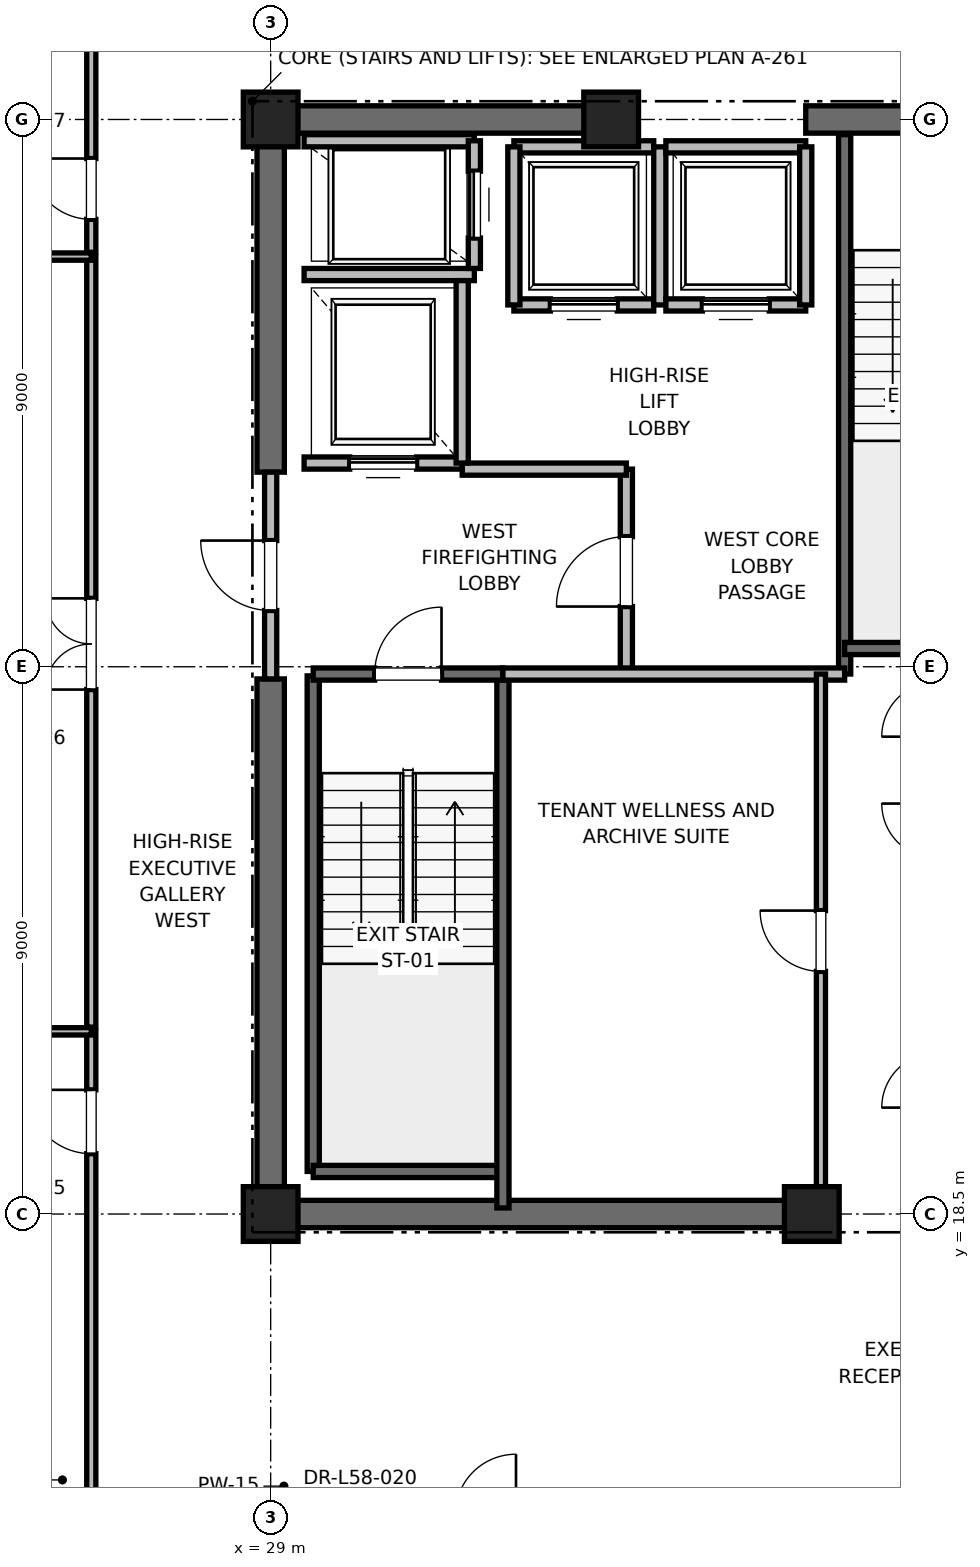
"""IFC4 building model, lengths in metres.
Left out: names, types, materials, properties, quantities, classifications, styles, units other than length and angle.
Written with IfcOpenShell. Run it as: python <this file> out.ifc"""

import sys

from ifc_helpers import new_model, si_unit, direction, frame, frame_2d, origin, origin_2d, place, context, subcontext, project, spatial, rectangle, extrude, element, fill, save


model = new_model("IFC4")
c1 = context("Model", 3, precision=1e-05, world=origin(), true_north=direction((0.0, 1.0)))
c2 = subcontext(c1, "Body", "Model", "MODEL_VIEW")
j1 = project(units=[si_unit("LENGTHUNIT", "METRE"), si_unit("PLANEANGLEUNIT", "RADIAN")], contexts=[c1])
p1 = place(None, origin())
s1 = spatial("IfcSite", under=j1, at=p1, CompositionType="ELEMENT")
p2 = place(p1, origin())
s2 = spatial("IfcBuilding", under=s1, at=p2, CompositionType="ELEMENT")
p3 = place(p2, frame((0.0, 0.0, 251.2)))
s3 = spatial("IfcBuildingStorey", under=s2, at=p3, CompositionType="ELEMENT", Elevation=251.2)
for number, where, z_axis, x_axis in (
    (1, (29.0, 18.5, 0.0), (0.0, 0.0, 1.0), (1.0, 0.0, 0.0)),
    (2, (29.0, 36.5, 0.0), (0.0, 0.0, 1.0), (1.0, 0.0, 0.0)),
    (3, (37.9, 18.5, 0.0), (0.0, 0.0, 1.0), (1.0, 0.0, 0.0)),
    (4, (34.6, 36.5, 0.0), (0.0, 0.0, 1.0), (1.0, 0.0, 0.0)),
):
    element("IfcColumn", number, at=place(p3, frame(where, z_axis=z_axis, x_axis=x_axis)), inside=s3, PredefinedType="PILASTER", context=c2, shape_type="SweptSolid", body=[
        extrude(rectangle(XDim=0.9, YDim=0.9, at=origin_2d()), origin(), (0.0, 0.0, 1.0), 4.0),
    ])
p4 = place(p3, frame((29.0, 18.5, 0.0), z_axis=(0.0, 0.0, 1.0), x_axis=(1.0, 0.0, 0.0)))
e5 = element("IfcWall", 5, at=p4, inside=s3, PredefinedType="SHEAR", context=c2, shape_type="SweptSolid", body=[
    extrude(rectangle(XDim=9.2, YDim=0.45, at=frame_2d((4.6, 0.0))), origin(), (0.0, 0.0, 1.0), 3.785),
])
p5 = place(p3, frame((29.0, 36.5, 0.0), z_axis=(0.0, 0.0, 1.0), x_axis=(1.0, 0.0, 0.0)))
e6 = element("IfcWall", 6, at=p5, inside=s3, PredefinedType="SHEAR", context=c2, shape_type="SweptSolid", body=[
    extrude(rectangle(XDim=5.8, YDim=0.45, at=frame_2d((2.9, 0.0))), origin(), (0.0, 0.0, 1.0), 3.785),
])
p6 = place(p3, frame((37.8, 36.5, 0.0), z_axis=(0.0, 0.0, 1.0), x_axis=(1.0, 0.0, 0.0)))
e7 = element("IfcWall", 7, at=p6, inside=s3, PredefinedType="SHEAR", context=c2, shape_type="SweptSolid", body=[
    extrude(rectangle(XDim=4.4, YDim=0.45, at=frame_2d((2.2, 0.0))), origin(), (0.0, 0.0, 1.0), 3.785),
])
p7 = place(p6, frame((1.65, 0.0, 0.0)))
e8 = element("IfcOpeningElement", 8, at=p7, cuts=e7, PredefinedType="OPENING", context=c2, shape_type="SweptSolid", body=[
    extrude(rectangle(XDim=1.1, YDim=2.15, at=frame_2d((0.55, 1.075))), frame((0.0, 0.225, 0.0), z_axis=(0.0, -1.0, 0.0), x_axis=(1.0, 0.0, 0.0)), (0.0, 0.0, 1.0), 0.45),
])
p8 = place(p3, frame((29.0, 18.5, 0.0), z_axis=(0.0, 0.0, 1.0), x_axis=(0.0, 1.0, 0.0)))
e9 = element("IfcWall", 9, at=p8, inside=s3, PredefinedType="SHEAR", context=c2, shape_type="SweptSolid", body=[
    extrude(rectangle(XDim=8.8, YDim=0.45, at=frame_2d((4.4, 0.0))), origin(), (0.0, 0.0, 1.0), 3.785),
])
p9 = place(p3, frame((29.0, 30.7, 0.0), z_axis=(0.0, 0.0, 1.0), x_axis=(0.0, 1.0, 0.0)))
e10 = element("IfcWall", 10, at=p9, inside=s3, PredefinedType="SHEAR", context=c2, shape_type="SweptSolid", body=[
    extrude(rectangle(XDim=5.8, YDim=0.45, at=frame_2d((2.9, 0.0))), origin(), (0.0, 0.0, 1.0), 3.785),
])
p10 = place(p3, frame((29.7, 19.2, 0.0), z_axis=(0.0, 0.0, 1.0), x_axis=(0.0, 1.0, 0.0)))
e11 = element("IfcWall", 11, at=p10, inside=s3, PredefinedType="SOLIDWALL", context=c2, shape_type="SweptSolid", body=[
    extrude(rectangle(XDim=8.15, YDim=0.2, at=frame_2d((4.075, 0.0))), origin(), (0.0, 0.0, 1.0), 3.785),
])
p11 = place(p3, frame((29.7, 19.2, 0.0), z_axis=(0.0, 0.0, 1.0), x_axis=(1.0, 0.0, 0.0)))
e12 = element("IfcWall", 12, at=p11, inside=s3, PredefinedType="SOLIDWALL", context=c2, shape_type="SweptSolid", body=[
    extrude(rectangle(XDim=3.12, YDim=0.2, at=frame_2d((1.56, 0.0))), origin(), (0.0, 0.0, 1.0), 3.785),
])
p12 = place(p3, frame((32.82, 18.6, 0.0), z_axis=(0.0, 0.0, 1.0), x_axis=(0.0, 1.0, 0.0)))
e13 = element("IfcWall", 13, at=p12, inside=s3, PredefinedType="SOLIDWALL", context=c2, shape_type="SweptSolid", body=[
    extrude(rectangle(XDim=8.78, YDim=0.2, at=frame_2d((4.39, 0.0))), origin(), (0.0, 0.0, 1.0), 3.785),
])
p13 = place(p3, frame((29.7, 27.38, 0.0), z_axis=(0.0, 0.0, 1.0), x_axis=(1.0, 0.0, 0.0)))
e14 = element("IfcWall", 14, at=p13, inside=s3, PredefinedType="SOLIDWALL", context=c2, shape_type="SweptSolid", body=[
    extrude(rectangle(XDim=3.12, YDim=0.2, at=frame_2d((1.56, 0.0))), origin(), (0.0, 0.0, 1.0), 3.785),
])
p14 = place(p13, frame((1.01, 0.0, 0.0)))
e15 = element("IfcOpeningElement", 15, at=p14, cuts=e14, PredefinedType="OPENING", context=c2, shape_type="SweptSolid", body=[
    extrude(rectangle(XDim=1.1, YDim=2.15, at=frame_2d((0.55, 1.075))), frame((0.0, 0.1, 0.0), z_axis=(0.0, -1.0, 0.0), x_axis=(1.0, 0.0, 0.0)), (0.0, 0.0, 1.0), 0.2),
])
p15 = place(p3, frame((38.44, 27.38, 0.0), z_axis=(0.0, 0.0, 1.0), x_axis=(0.0, 1.0, 0.0)))
e16 = element("IfcWall", 16, at=p15, inside=s3, PredefinedType="SOLIDWALL", context=c2, shape_type="SweptSolid", body=[
    extrude(rectangle(XDim=8.87, YDim=0.2, at=frame_2d((4.435, 0.0))), origin(), (0.0, 0.0, 1.0), 3.785),
])
p16 = place(p3, frame((38.44, 27.8, 0.0), z_axis=(0.0, 0.0, 1.0), x_axis=(1.0, 0.0, 0.0)))
e17 = element("IfcWall", 17, at=p16, inside=s3, PredefinedType="SOLIDWALL", context=c2, shape_type="SweptSolid", body=[
    extrude(rectangle(XDim=3.32, YDim=0.2, at=frame_2d((1.66, 0.0))), origin(), (0.0, 0.0, 1.0), 3.785),
])
p17 = place(p3, frame((34.85, 27.38, 0.0), z_axis=(0.0, 0.0, 1.0), x_axis=(0.0, 1.0, 0.0)))
e18 = element("IfcWall", 18, at=p17, inside=s3, PredefinedType="PARTITIONING", context=c2, shape_type="SweptSolid", body=[
    extrude(rectangle(XDim=3.37, YDim=0.2, at=frame_2d((1.685, 0.0))), origin(), (0.0, 0.0, 1.0), 3.785),
])
p18 = place(p17, frame((1.11, 0.0, 0.0)))
e19 = element("IfcOpeningElement", 19, at=p18, cuts=e18, PredefinedType="OPENING", context=c2, shape_type="SweptSolid", body=[
    extrude(rectangle(XDim=1.15, YDim=2.2, at=frame_2d((0.575, 1.1))), frame((0.0, 0.1, 0.0), z_axis=(0.0, -1.0, 0.0), x_axis=(1.0, 0.0, 0.0)), (0.0, 0.0, 1.0), 0.2),
])
p19 = place(p3, frame((29.0, 27.3, 0.0), z_axis=(0.0, 0.0, 1.0), x_axis=(0.0, 1.0, 0.0)))
e20 = element("IfcWall", 20, at=p19, inside=s3, PredefinedType="PARTITIONING", context=c2, shape_type="SweptSolid", body=[
    extrude(rectangle(XDim=3.4, YDim=0.2, at=frame_2d((1.7, 0.0))), origin(), (0.0, 0.0, 1.0), 2.865),
])
p20 = place(p19, frame((1.125, 0.0, 0.0)))
e21 = element("IfcOpeningElement", 21, at=p20, cuts=e20, PredefinedType="OPENING", context=c2, shape_type="SweptSolid", body=[
    extrude(rectangle(XDim=1.15, YDim=2.2, at=frame_2d((0.575, 1.1))), frame((0.0, 0.1, 0.0), z_axis=(0.0, -1.0, 0.0), x_axis=(1.0, 0.0, 0.0)), (0.0, 0.0, 1.0), 0.2),
])
p21 = place(p3, frame((32.82, 27.38, 0.0), z_axis=(0.0, 0.0, 1.0), x_axis=(1.0, 0.0, 0.0)))
e22 = element("IfcWall", 22, at=p21, inside=s3, PredefinedType="PARTITIONING", context=c2, shape_type="SweptSolid", body=[
    extrude(rectangle(XDim=5.62, YDim=0.2, at=frame_2d((2.81, 0.0))), origin(), (0.0, 0.0, 1.0), 3.785),
])
p22 = place(p3, frame((32.15, 30.75, 0.0), z_axis=(0.0, 0.0, 1.0), x_axis=(1.0, 0.0, 0.0)))
e23 = element("IfcWall", 23, at=p22, inside=s3, PredefinedType="PARTITIONING", context=c2, shape_type="SweptSolid", body=[
    extrude(rectangle(XDim=2.7, YDim=0.2, at=frame_2d((1.35, 0.0))), origin(), (0.0, 0.0, 1.0), 3.785),
])
p23 = place(p3, frame((29.55, 30.85, 0.0), z_axis=(0.0, 0.0, 1.0), x_axis=(1.0, 0.0, 0.0)))
e24 = element("IfcWall", 24, at=p23, inside=s3, PredefinedType="SOLIDWALL", context=c2, shape_type="SweptSolid", body=[
    extrude(rectangle(XDim=2.6, YDim=0.2, at=frame_2d((1.3, 0.0))), origin(), (0.0, 0.0, 1.0), 2.865),
])
p24 = place(p23, frame((0.75, 0.0, 0.0)))
e25 = element("IfcOpeningElement", 25, at=p24, cuts=e24, PredefinedType="OPENING", context=c2, shape_type="SweptSolid", body=[
    extrude(rectangle(XDim=1.1, YDim=2.2, at=frame_2d((0.55, 1.1))), frame((0.0, 0.1, 0.0), z_axis=(0.0, -1.0, 0.0), x_axis=(1.0, 0.0, 0.0)), (0.0, 0.0, 1.0), 0.2),
])
p25 = place(p3, frame((29.55, 33.95, 0.0), z_axis=(0.0, 0.0, 1.0), x_axis=(1.0, 0.0, 0.0)))
e26 = element("IfcWall", 26, at=p25, inside=s3, PredefinedType="SOLIDWALL", context=c2, shape_type="SweptSolid", body=[
    extrude(rectangle(XDim=2.8, YDim=0.2, at=frame_2d((1.4, 0.0))), origin(), (0.0, 0.0, 1.0), 3.785),
])
p26 = place(p3, frame((32.15, 30.85, 0.0), z_axis=(0.0, 0.0, 1.0), x_axis=(0.0, 1.0, 0.0)))
e27 = element("IfcWall", 27, at=p26, inside=s3, PredefinedType="SOLIDWALL", context=c2, shape_type="SweptSolid", body=[
    extrude(rectangle(XDim=3.0, YDim=0.2, at=frame_2d((1.5, 0.0))), origin(), (0.0, 0.0, 1.0), 3.785),
])
p27 = place(p3, frame((32.35, 36.15, 0.0), z_axis=(0.0, 0.0, 1.0), x_axis=(-1.0, 0.0, 0.0)))
e28 = element("IfcWall", 28, at=p27, inside=s3, PredefinedType="SOLIDWALL", context=c2, shape_type="SweptSolid", body=[
    extrude(rectangle(XDim=2.8, YDim=0.2, at=frame_2d((1.4, 0.0))), origin(), (0.0, 0.0, 1.0), 3.148),
])
p28 = place(p3, frame((32.35, 34.05, 0.0), z_axis=(0.0, 0.0, 1.0), x_axis=(0.0, 1.0, 0.0)))
e29 = element("IfcWall", 29, at=p28, inside=s3, PredefinedType="SOLIDWALL", context=c2, shape_type="SweptSolid", body=[
    extrude(rectangle(XDim=2.1, YDim=0.2, at=frame_2d((1.05, 0.0))), origin(), (0.0, 0.0, 1.0), 3.785),
])
p29 = place(p28, frame((0.5, 0.0, 0.0)))
e30 = element("IfcOpeningElement", 30, at=p29, cuts=e29, PredefinedType="OPENING", context=c2, shape_type="SweptSolid", body=[
    extrude(rectangle(XDim=1.1, YDim=2.2, at=frame_2d((0.55, 1.1))), frame((0.0, 0.1, 0.0), z_axis=(0.0, -1.0, 0.0), x_axis=(1.0, 0.0, 0.0)), (0.0, 0.0, 1.0), 0.2),
])
p30 = place(p3, frame((33.0, 33.45, 0.0), z_axis=(0.0, 0.0, 1.0), x_axis=(1.0, 0.0, 0.0)))
e31 = element("IfcWall", 31, at=p30, inside=s3, PredefinedType="SOLIDWALL", context=c2, shape_type="SweptSolid", body=[
    extrude(rectangle(XDim=2.3, YDim=0.2, at=frame_2d((1.15, 0.0))), origin(), (0.0, 0.0, 1.0), 3.785),
])
p31 = place(p30, frame((0.6, 0.0, 0.0)))
e32 = element("IfcOpeningElement", 32, at=p31, cuts=e31, PredefinedType="OPENING", context=c2, shape_type="SweptSolid", body=[
    extrude(rectangle(XDim=1.1, YDim=2.2, at=frame_2d((0.55, 1.1))), frame((0.0, 0.1, 0.0), z_axis=(0.0, -1.0, 0.0), x_axis=(1.0, 0.0, 0.0)), (0.0, 0.0, 1.0), 0.2),
])
p32 = place(p3, frame((35.3, 36.05, 0.0), z_axis=(0.0, 0.0, 1.0), x_axis=(-1.0, 0.0, 0.0)))
e33 = element("IfcWall", 33, at=p32, inside=s3, PredefinedType="SOLIDWALL", context=c2, shape_type="SweptSolid", body=[
    extrude(rectangle(XDim=2.3, YDim=0.2, at=frame_2d((1.15, 0.0))), origin(), (0.0, 0.0, 1.0), 2.865),
])
p33 = place(p3, frame((33.0, 36.05, 0.0), z_axis=(0.0, 0.0, 1.0), x_axis=(0.0, -1.0, 0.0)))
e34 = element("IfcWall", 34, at=p33, inside=s3, PredefinedType="SOLIDWALL", context=c2, shape_type="SweptSolid", body=[
    extrude(rectangle(XDim=2.6, YDim=0.2, at=frame_2d((1.3, 0.0))), origin(), (0.0, 0.0, 1.0), 3.785),
])
p34 = place(p3, frame((35.4, 33.45, 0.0), z_axis=(0.0, 0.0, 1.0), x_axis=(0.0, 1.0, 0.0)))
e35 = element("IfcWall", 35, at=p34, inside=s3, PredefinedType="SOLIDWALL", context=c2, shape_type="SweptSolid", body=[
    extrude(rectangle(XDim=2.6, YDim=0.2, at=frame_2d((1.3, 0.0))), origin(), (0.0, 0.0, 1.0), 2.865),
])
p35 = place(p3, frame((35.5, 33.45, 0.0), z_axis=(0.0, 0.0, 1.0), x_axis=(1.0, 0.0, 0.0)))
e36 = element("IfcWall", 36, at=p35, inside=s3, PredefinedType="SOLIDWALL", context=c2, shape_type="SweptSolid", body=[
    extrude(rectangle(XDim=2.3, YDim=0.2, at=frame_2d((1.15, 0.0))), origin(), (0.0, 0.0, 1.0), 3.785),
])
p36 = place(p35, frame((0.6, 0.0, 0.0)))
e37 = element("IfcOpeningElement", 37, at=p36, cuts=e36, PredefinedType="OPENING", context=c2, shape_type="SweptSolid", body=[
    extrude(rectangle(XDim=1.1, YDim=2.2, at=frame_2d((0.55, 1.1))), frame((0.0, 0.1, 0.0), z_axis=(0.0, -1.0, 0.0), x_axis=(1.0, 0.0, 0.0)), (0.0, 0.0, 1.0), 0.2),
])
p37 = place(p3, frame((37.8, 36.05, 0.0), z_axis=(0.0, 0.0, 1.0), x_axis=(-1.0, 0.0, 0.0)))
e38 = element("IfcWall", 38, at=p37, inside=s3, PredefinedType="SOLIDWALL", context=c2, shape_type="SweptSolid", body=[
    extrude(rectangle(XDim=2.3, YDim=0.2, at=frame_2d((1.15, 0.0))), origin(), (0.0, 0.0, 1.0), 2.865),
])
p38 = place(p3, frame((37.8, 33.45, 0.0), z_axis=(0.0, 0.0, 1.0), x_axis=(0.0, 1.0, 0.0)))
e39 = element("IfcWall", 39, at=p38, inside=s3, PredefinedType="SOLIDWALL", context=c2, shape_type="SweptSolid", body=[
    extrude(rectangle(XDim=2.6, YDim=0.2, at=frame_2d((1.3, 0.0))), origin(), (0.0, 0.0, 1.0), 2.865),
])
p39 = place(p3, frame((38.05, 18.6, 0.0), z_axis=(0.0, 0.0, 1.0), x_axis=(0.0, 1.0, 0.0)))
e40 = element("IfcWall", 40, at=p39, inside=s3, PredefinedType="PARTITIONING", context=c2, shape_type="SweptSolid", body=[
    extrude(rectangle(XDim=8.78, YDim=0.15, at=frame_2d((4.39, 0.0))), origin(), (0.0, 0.0, 1.0), 2.85),
])
p40 = place(p39, frame((3.89, 0.0, 0.0)))
e41 = element("IfcOpeningElement", 41, at=p40, cuts=e40, PredefinedType="OPENING", context=c2, shape_type="SweptSolid", body=[
    extrude(rectangle(XDim=1.0, YDim=2.15, at=frame_2d((0.5, 1.075))), frame((0.0, 0.075, 0.0), z_axis=(0.0, -1.0, 0.0), x_axis=(1.0, 0.0, 0.0)), (0.0, 0.0, 1.0), 0.15),
])
p41 = place(p3, frame((26.05, 8.762, 0.0), z_axis=(0.0, 0.0, 1.0), x_axis=(0.0, 1.0, 0.0)))
e42 = element("IfcWall", 42, at=p41, inside=s3, PredefinedType="PARTITIONING", context=c2, shape_type="SweptSolid", body=[
    extrude(rectangle(XDim=12.741, YDim=0.15, at=frame_2d((6.371, 0.0))), origin(), (0.0, 0.0, 1.0), 2.85),
])
p42 = place(p41, frame((10.729, 0.0, 0.0)))
e43 = element("IfcOpeningElement", 43, at=p42, cuts=e42, PredefinedType="OPENING", context=c2, shape_type="SweptSolid", body=[
    extrude(rectangle(XDim=1.05, YDim=2.2, at=frame_2d((0.525, 1.1))), frame((0.0, 0.075, 0.0), z_axis=(0.0, -1.0, 0.0), x_axis=(1.0, 0.0, 0.0)), (0.0, 0.0, 1.0), 0.15),
])
p43 = place(p3, frame((13.704, 21.504, 0.0), z_axis=(0.0, 0.0, 1.0), x_axis=(1.0, 0.0, 0.0)))
e44 = element("IfcWall", 44, at=p43, inside=s3, PredefinedType="PARTITIONING", context=c2, shape_type="SweptSolid", body=[
    extrude(rectangle(XDim=12.346, YDim=0.12, at=frame_2d((6.173, 0.0))), origin(), (0.0, 0.0, 1.0), 2.85),
])
p44 = place(p3, frame((26.05, 21.574, 0.0), z_axis=(0.0, 0.0, 1.0), x_axis=(0.0, 1.0, 0.0)))
e45 = element("IfcWall", 45, at=p44, inside=s3, PredefinedType="PARTITIONING", context=c2, shape_type="SweptSolid", body=[
    extrude(rectangle(XDim=12.672, YDim=0.15, at=frame_2d((6.336, 0.0))), origin(), (0.0, 0.0, 1.0), 2.85),
])
p45 = place(p44, frame((5.551, 0.0, 0.0)))
e46 = element("IfcOpeningElement", 46, at=p45, cuts=e45, PredefinedType="OPENING", context=c2, shape_type="SweptSolid", body=[
    extrude(rectangle(XDim=1.5, YDim=2.25, at=frame_2d((0.75, 1.125))), frame((0.0, 0.075, 0.0), z_axis=(0.0, -1.0, 0.0), x_axis=(1.0, 0.0, 0.0)), (0.0, 0.0, 1.0), 0.15),
])
p46 = place(p3, frame((13.704, 34.246, 0.0), z_axis=(0.0, 0.0, 1.0), x_axis=(1.0, 0.0, 0.0)))
e47 = element("IfcWall", 47, at=p46, inside=s3, PredefinedType="PARTITIONING", context=c2, shape_type="SweptSolid", body=[
    extrude(rectangle(XDim=12.346, YDim=0.12, at=frame_2d((6.173, 0.0))), origin(), (0.0, 0.0, 1.0), 2.85),
])
p47 = place(p3, frame((26.05, 34.315, 0.0), z_axis=(0.0, 0.0, 1.0), x_axis=(0.0, 1.0, 0.0)))
e48 = element("IfcWall", 48, at=p47, inside=s3, PredefinedType="PARTITIONING", context=c2, shape_type="SweptSolid", body=[
    extrude(rectangle(XDim=11.922, YDim=0.15, at=frame_2d((5.961, 0.0))), origin(), (0.0, 0.0, 1.0), 2.85),
])
p48 = place(p47, frame((0.542, 0.0, 0.0)))
e49 = element("IfcOpeningElement", 49, at=p48, cuts=e48, PredefinedType="OPENING", context=c2, shape_type="SweptSolid", body=[
    extrude(rectangle(XDim=1.0, YDim=2.15, at=frame_2d((0.5, 1.075))), frame((0.0, 0.075, 0.0), z_axis=(0.0, -1.0, 0.0), x_axis=(1.0, 0.0, 0.0)), (0.0, 0.0, 1.0), 0.15),
])
p49 = place(p14, origin())
e50 = element("IfcDoor", 50, at=p49, inside=s3, OperationType="SINGLE_SWING_RIGHT", PredefinedType="DOOR", context=c2, shape_type="SweptSolid", body=[
    extrude(rectangle(XDim=1.1, YDim=2.15, at=frame_2d((0.55, 1.075))), frame((0.0, 0.025, 0.0), z_axis=(0.0, -1.0, 0.0), x_axis=(1.0, 0.0, 0.0)), (0.0, 0.0, 1.0), 0.05),
])
fill(e15, e50)
p50 = place(p18, origin())
e51 = element("IfcDoor", 51, at=p50, inside=s3, OperationType="SINGLE_SWING_LEFT", PredefinedType="DOOR", context=c2, shape_type="SweptSolid", body=[
    extrude(rectangle(XDim=1.15, YDim=2.2, at=frame_2d((0.575, 1.1))), frame((0.0, 0.025, 0.0), z_axis=(0.0, -1.0, 0.0), x_axis=(1.0, 0.0, 0.0)), (0.0, 0.0, 1.0), 0.05),
])
fill(e19, e51)
p51 = place(p20, origin())
e52 = element("IfcDoor", 52, at=p51, inside=s3, OperationType="SINGLE_SWING_RIGHT", PredefinedType="DOOR", context=c2, shape_type="SweptSolid", body=[
    extrude(rectangle(XDim=1.15, YDim=2.2, at=frame_2d((0.575, 1.1))), frame((0.0, 0.025, 0.0), z_axis=(0.0, -1.0, 0.0), x_axis=(1.0, 0.0, 0.0)), (0.0, 0.0, 1.0), 0.05),
])
fill(e21, e52)
p52 = place(p24, origin())
e53 = element("IfcDoor", 53, at=p52, inside=s3, OperationType="SLIDING_TO_RIGHT", PredefinedType="DOOR", context=c2, shape_type="SweptSolid", body=[
    extrude(rectangle(XDim=1.1, YDim=2.2, at=frame_2d((0.55, 1.1))), frame((0.0, 0.025, 0.0), z_axis=(0.0, -1.0, 0.0), x_axis=(1.0, 0.0, 0.0)), (0.0, 0.0, 1.0), 0.05),
])
fill(e25, e53)
p53 = place(p29, origin())
e54 = element("IfcDoor", 54, at=p53, inside=s3, OperationType="SLIDING_TO_RIGHT", PredefinedType="DOOR", context=c2, shape_type="SweptSolid", body=[
    extrude(rectangle(XDim=1.1, YDim=2.2, at=frame_2d((0.55, 1.1))), frame((0.0, 0.025, 0.0), z_axis=(0.0, -1.0, 0.0), x_axis=(1.0, 0.0, 0.0)), (0.0, 0.0, 1.0), 0.05),
])
fill(e30, e54)
p54 = place(p31, origin())
e55 = element("IfcDoor", 55, at=p54, inside=s3, OperationType="SLIDING_TO_RIGHT", PredefinedType="DOOR", context=c2, shape_type="SweptSolid", body=[
    extrude(rectangle(XDim=1.1, YDim=2.2, at=frame_2d((0.55, 1.1))), frame((0.0, 0.025, 0.0), z_axis=(0.0, -1.0, 0.0), x_axis=(1.0, 0.0, 0.0)), (0.0, 0.0, 1.0), 0.05),
])
fill(e32, e55)
p55 = place(p36, origin())
e56 = element("IfcDoor", 56, at=p55, inside=s3, OperationType="SLIDING_TO_RIGHT", PredefinedType="DOOR", context=c2, shape_type="SweptSolid", body=[
    extrude(rectangle(XDim=1.1, YDim=2.2, at=frame_2d((0.55, 1.1))), frame((0.0, 0.025, 0.0), z_axis=(0.0, -1.0, 0.0), x_axis=(1.0, 0.0, 0.0)), (0.0, 0.0, 1.0), 0.05),
])
fill(e37, e56)
p56 = place(p40, origin())
e57 = element("IfcDoor", 57, at=p56, inside=s3, OperationType="SINGLE_SWING_RIGHT", PredefinedType="DOOR", context=c2, shape_type="SweptSolid", body=[
    extrude(rectangle(XDim=1.0, YDim=2.15, at=frame_2d((0.5, 1.075))), frame((0.0, 0.025, 0.0), z_axis=(0.0, -1.0, 0.0), x_axis=(1.0, 0.0, 0.0)), (0.0, 0.0, 1.0), 0.05),
])
fill(e41, e57)
p57 = place(p42, origin())
e58 = element("IfcDoor", 58, at=p57, inside=s3, OperationType="SINGLE_SWING_RIGHT", PredefinedType="DOOR", context=c2, shape_type="SweptSolid", body=[
    extrude(rectangle(XDim=1.05, YDim=2.2, at=frame_2d((0.525, 1.1))), frame((0.0, 0.025, 0.0), z_axis=(0.0, -1.0, 0.0), x_axis=(1.0, 0.0, 0.0)), (0.0, 0.0, 1.0), 0.05),
])
fill(e43, e58)
p58 = place(p45, origin())
e59 = element("IfcDoor", 59, at=p58, inside=s3, OperationType="DOUBLE_DOOR_SINGLE_SWING", PredefinedType="DOOR", context=c2, shape_type="SweptSolid", body=[
    extrude(rectangle(XDim=1.5, YDim=2.25, at=frame_2d((0.75, 1.125))), frame((0.0, 0.025, 0.0), z_axis=(0.0, -1.0, 0.0), x_axis=(1.0, 0.0, 0.0)), (0.0, 0.0, 1.0), 0.05),
])
fill(e46, e59)
p59 = place(p48, origin())
e60 = element("IfcDoor", 60, at=p59, inside=s3, OperationType="SINGLE_SWING_RIGHT", PredefinedType="DOOR", context=c2, shape_type="SweptSolid", body=[
    extrude(rectangle(XDim=1.0, YDim=2.15, at=frame_2d((0.5, 1.075))), frame((0.0, 0.025, 0.0), z_axis=(0.0, -1.0, 0.0), x_axis=(1.0, 0.0, 0.0)), (0.0, 0.0, 1.0), 0.05),
])
fill(e49, e60)
save(model, sys.argv[1])
